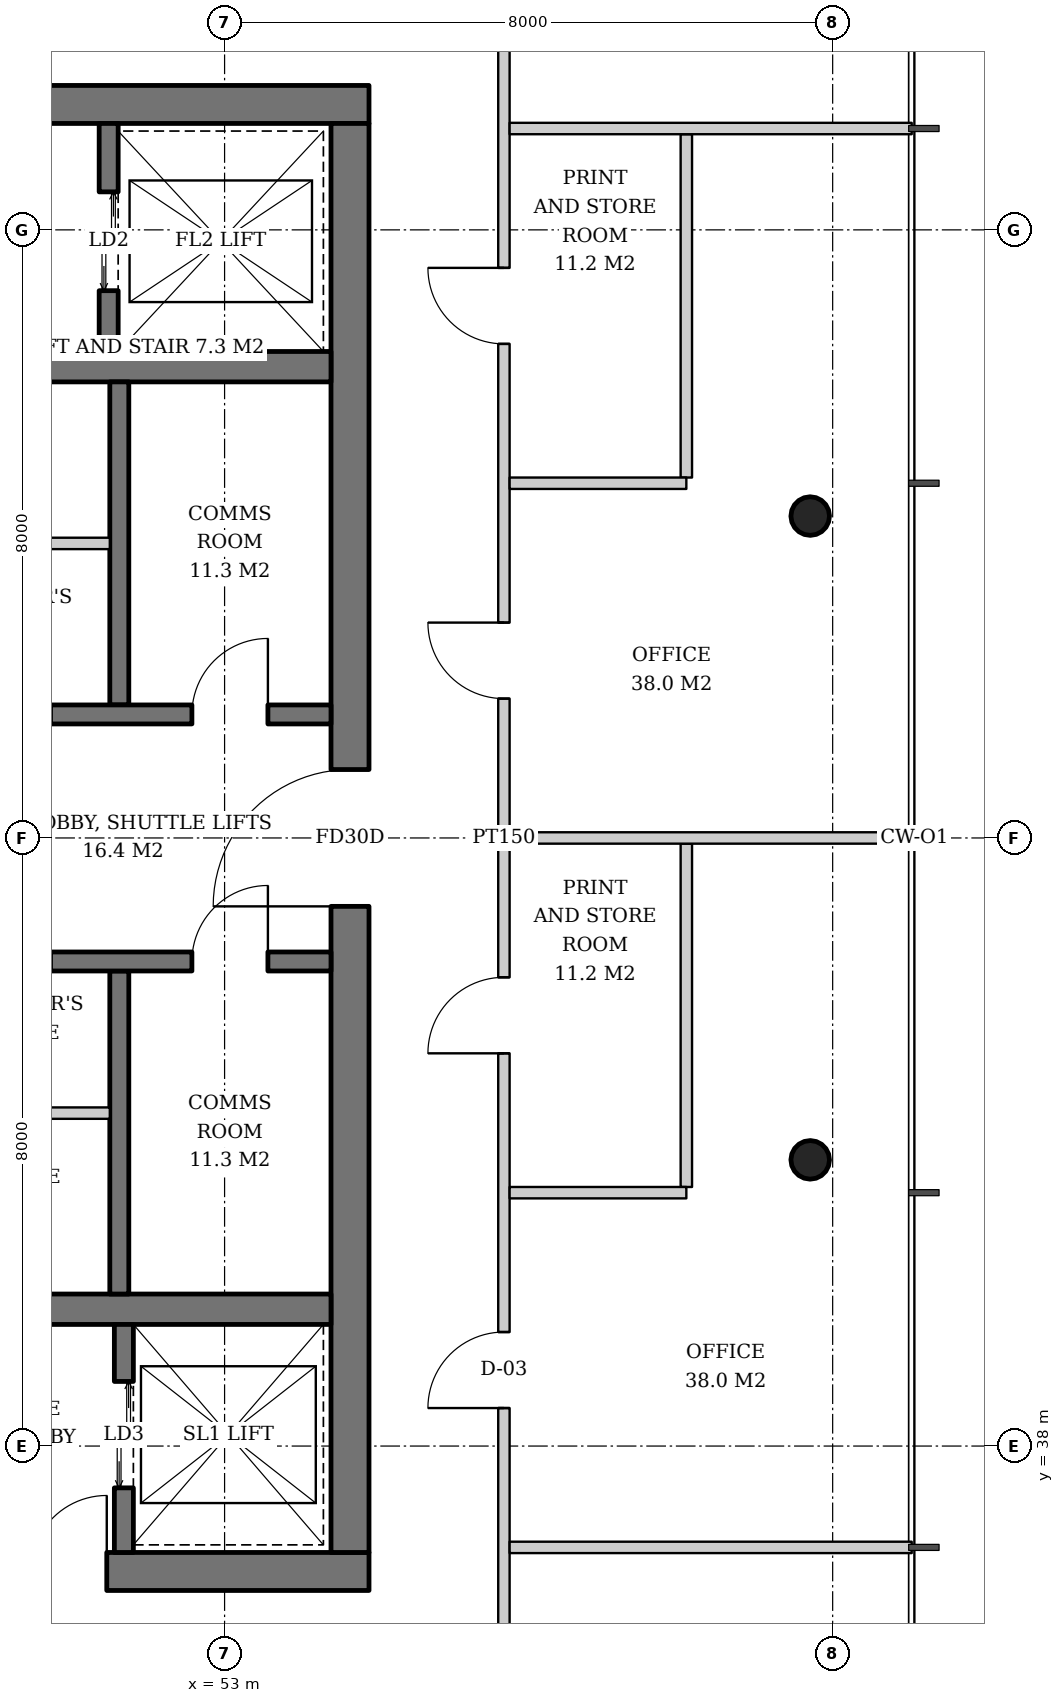
"""IFC4 building model, lengths in metres.
Left out: names, types, materials, properties, quantities, classifications, styles, units other than length and angle.
Written with IfcOpenShell. Run it as: python <this file> out.ifc"""

import sys

from ifc_helpers import new_model, si_unit, direction, frame, frame_2d, origin, origin_2d, place, context, subcontext, project, spatial, rectangle, hollow_circle, extrude, element, fill, save


model = new_model("IFC4")
c1 = context("Model", 3, precision=1e-05, world=origin(), true_north=direction((0.0, 1.0)))
c2 = subcontext(c1, "Body", "Model", "MODEL_VIEW")
j1 = project(units=[si_unit("LENGTHUNIT", "METRE"), si_unit("PLANEANGLEUNIT", "RADIAN")], contexts=[c1])
p1 = place(None, origin())
s1 = spatial("IfcSite", under=j1, at=p1, CompositionType="ELEMENT")
p2 = place(p1, origin())
s2 = spatial("IfcBuilding", under=s1, at=p2, CompositionType="ELEMENT")
p3 = place(p2, frame((0.0, 0.0, 279.4)))
s3 = spatial("IfcBuildingStorey", under=s2, at=p3, CompositionType="ELEMENT", Elevation=279.4)
for number, where, z_axis, x_axis in (
    (1, (60.743, 41.752, 0.0), (-0.032, 0.011, 0.999), (-0.316, -0.949, 0.0)),
    (2, (60.743, 50.248, 0.0), (-0.032, -0.011, 0.999), (0.316, -0.949, 0.0)),
):
    element("IfcColumn", number, at=place(p3, frame(where, z_axis=z_axis, x_axis=x_axis)), inside=s3, PredefinedType="COLUMN", context=c2, shape_type="SweptSolid", body=[
        extrude(hollow_circle(Radius=0.254, WallThickness=0.02, at=origin_2d()), origin(), (0.0, 0.0, 1.0), 3.802),
    ])
p4 = place(p3, frame((35.1, 36.35, 0.0), z_axis=(0.0, 0.0, 1.0), x_axis=(1.0, 0.0, 0.0)))
e3 = element("IfcWall", 3, at=p4, inside=s3, PredefinedType="SHEAR", context=c2, shape_type="SweptSolid", body=[
    extrude(rectangle(XDim=19.8, YDim=0.5, at=frame_2d((9.9, 0.0))), origin(), (0.0, 0.0, 1.0), 3.8),
])
p5 = place(p4, frame((3.9, 0.0, 0.0)))
e4 = element("IfcOpeningElement", 4, at=p5, cuts=e3, PredefinedType="OPENING", context=c2, shape_type="SweptSolid", body=[
    extrude(rectangle(XDim=1.0, YDim=2.1, at=frame_2d((0.5, 1.05))), frame((0.0, 0.26, 0.0), z_axis=(0.0, -1.0, 0.0), x_axis=(1.0, 0.0, 0.0)), (0.0, 0.0, 1.0), 0.52),
])
p6 = place(p4, frame((15.35, 0.0, 0.0)))
e5 = element("IfcOpeningElement", 5, at=p6, cuts=e3, PredefinedType="OPENING", context=c2, shape_type="SweptSolid", body=[
    extrude(rectangle(XDim=1.0, YDim=2.1, at=frame_2d((0.5, 1.05))), frame((0.0, 0.26, 0.0), z_axis=(0.0, -1.0, 0.0), x_axis=(1.0, 0.0, 0.0)), (0.0, 0.0, 1.0), 0.52),
])
p7 = place(p3, frame((35.1, 55.65, 0.0), z_axis=(0.0, 0.0, 1.0), x_axis=(1.0, 0.0, 0.0)))
e6 = element("IfcWall", 6, at=p7, inside=s3, PredefinedType="SHEAR", context=c2, shape_type="SweptSolid", body=[
    extrude(rectangle(XDim=19.8, YDim=0.5, at=frame_2d((9.9, 0.0))), origin(), (0.0, 0.0, 1.0), 3.8),
])
p8 = place(p7, frame((14.54, 0.0, 0.0)))
e7 = element("IfcOpeningElement", 7, at=p8, cuts=e6, PredefinedType="OPENING", context=c2, shape_type="SweptSolid", body=[
    extrude(rectangle(XDim=1.0, YDim=2.1, at=frame_2d((0.5, 1.05))), frame((0.0, 0.26, 0.0), z_axis=(0.0, -1.0, 0.0), x_axis=(1.0, 0.0, 0.0)), (0.0, 0.0, 1.0), 0.52),
])
p9 = place(p7, frame((0.865, 0.0, 0.0)))
e8 = element("IfcOpeningElement", 8, at=p9, cuts=e6, PredefinedType="OPENING", context=c2, shape_type="SweptSolid", body=[
    extrude(rectangle(XDim=1.0, YDim=2.1, at=frame_2d((0.5, 1.05))), frame((0.0, 0.26, 0.0), z_axis=(0.0, -1.0, 0.0), x_axis=(1.0, 0.0, 0.0)), (0.0, 0.0, 1.0), 0.52),
])
p10 = place(p7, frame((2.399, 0.0, 0.0)))
e9 = element("IfcOpeningElement", 9, at=p10, cuts=e6, PredefinedType="OPENING", context=c2, shape_type="SweptSolid", body=[
    extrude(rectangle(XDim=1.0, YDim=2.1, at=frame_2d((0.5, 1.05))), frame((0.0, 0.26, 0.0), z_axis=(0.0, -1.0, 0.0), x_axis=(1.0, 0.0, 0.0)), (0.0, 0.0, 1.0), 0.52),
])
p11 = place(p7, frame((3.966, 0.0, 0.0)))
e10 = element("IfcOpeningElement", 10, at=p11, cuts=e6, PredefinedType="OPENING", context=c2, shape_type="SweptSolid", body=[
    extrude(rectangle(XDim=1.0, YDim=2.1, at=frame_2d((0.5, 1.05))), frame((0.0, 0.26, 0.0), z_axis=(0.0, -1.0, 0.0), x_axis=(1.0, 0.0, 0.0)), (0.0, 0.0, 1.0), 0.52),
])
p12 = place(p3, frame((54.65, 36.6, 0.0), z_axis=(0.0, 0.0, 1.0), x_axis=(0.0, 1.0, 0.0)))
e11 = element("IfcWall", 11, at=p12, inside=s3, PredefinedType="SHEAR", context=c2, shape_type="SweptSolid", body=[
    extrude(rectangle(XDim=18.8, YDim=0.5, at=frame_2d((9.4, 0.0))), origin(), (0.0, 0.0, 1.0), 3.8),
])
p13 = place(p12, frame((8.5, 0.0, 0.0)))
e12 = element("IfcOpeningElement", 12, at=p13, cuts=e11, PredefinedType="OPENING", context=c2, shape_type="SweptSolid", body=[
    extrude(rectangle(XDim=1.8, YDim=2.4, at=frame_2d((0.9, 1.2))), frame((0.0, 0.26, 0.0), z_axis=(0.0, -1.0, 0.0), x_axis=(1.0, 0.0, 0.0)), (0.0, 0.0, 1.0), 0.52),
])
for number, where, z_axis, x_axis in (
    (13, (35.6, 39.8, 0.0), (0.0, 0.0, 1.0), (1.0, 0.0, 0.0)),
    (14, (35.6, 52.2, 0.0), (0.0, 0.0, 1.0), (1.0, 0.0, 0.0)),
):
    element("IfcWall", number, at=place(p3, frame(where, z_axis=z_axis, x_axis=x_axis)), inside=s3, PredefinedType="SHEAR", context=c2, shape_type="SweptSolid", body=[
        extrude(rectangle(XDim=18.8, YDim=0.4, at=frame_2d((9.4, 0.0))), origin(), (0.0, 0.0, 1.0), 3.8),
    ])
p14 = place(p3, frame((51.675, 36.6, 0.0), z_axis=(0.0, 0.0, 1.0), x_axis=(0.0, 1.0, 0.0)))
e15 = element("IfcWall", 15, at=p14, inside=s3, PredefinedType="SHEAR", context=c2, shape_type="SweptSolid", body=[
    extrude(rectangle(XDim=3.0, YDim=0.25, at=frame_2d((1.5, 0.0))), origin(), (0.0, 0.0, 1.0), 3.8),
])
p15 = place(p14, frame((0.85, 0.0, 0.0)))
e16 = element("IfcOpeningElement", 16, at=p15, cuts=e15, PredefinedType="OPENING", context=c2, shape_type="SweptSolid", body=[
    extrude(rectangle(XDim=1.4, YDim=2.4, at=frame_2d((0.7, 1.2))), frame((0.0, 0.135, 0.0), z_axis=(0.0, -1.0, 0.0), x_axis=(1.0, 0.0, 0.0)), (0.0, 0.0, 1.0), 0.27),
])
p16 = place(p3, frame((51.475, 52.4, 0.0), z_axis=(0.0, 0.0, 1.0), x_axis=(0.0, 1.0, 0.0)))
e17 = element("IfcWall", 17, at=p16, inside=s3, PredefinedType="SHEAR", context=c2, shape_type="SweptSolid", body=[
    extrude(rectangle(XDim=3.0, YDim=0.25, at=frame_2d((1.5, 0.0))), origin(), (0.0, 0.0, 1.0), 3.8),
])
p17 = place(p16, frame((0.8, 0.0, 0.0)))
e18 = element("IfcOpeningElement", 18, at=p17, cuts=e17, PredefinedType="OPENING", context=c2, shape_type="SweptSolid", body=[
    extrude(rectangle(XDim=1.3, YDim=2.2, at=frame_2d((0.65, 1.1))), frame((0.0, 0.135, 0.0), z_axis=(0.0, -1.0, 0.0), x_axis=(1.0, 0.0, 0.0)), (0.0, 0.0, 1.0), 0.27),
])
p18 = place(p3, frame((51.615, 47.75, 0.0), z_axis=(0.0, 0.0, 1.0), x_axis=(0.0, 1.0, 0.0)))
e19 = element("IfcWall", 19, at=p18, inside=s3, PredefinedType="SHEAR", context=c2, shape_type="SweptSolid", body=[
    extrude(rectangle(XDim=4.25, YDim=0.25, at=frame_2d((2.125, 0.0))), origin(), (0.0, 0.0, 1.0), 3.8),
])
p19 = place(p3, frame((48.93, 47.625, 0.0), z_axis=(0.0, 0.0, 1.0), x_axis=(1.0, 0.0, 0.0)))
e20 = element("IfcWall", 20, at=p19, inside=s3, PredefinedType="SHEAR", context=c2, shape_type="SweptSolid", body=[
    extrude(rectangle(XDim=5.47, YDim=0.25, at=frame_2d((2.735, 0.0))), origin(), (0.0, 0.0, 1.0), 3.8),
])
p20 = place(p19, frame((0.78, 0.0, 0.0)))
e21 = element("IfcOpeningElement", 21, at=p20, cuts=e20, PredefinedType="OPENING", context=c2, shape_type="SweptSolid", body=[
    extrude(rectangle(XDim=1.0, YDim=2.1, at=frame_2d((0.5, 1.05))), frame((0.0, 0.135, 0.0), z_axis=(0.0, -1.0, 0.0), x_axis=(1.0, 0.0, 0.0)), (0.0, 0.0, 1.0), 0.27),
])
p21 = place(p19, frame((3.64, 0.0, 0.0)))
e22 = element("IfcOpeningElement", 22, at=p21, cuts=e20, PredefinedType="OPENING", context=c2, shape_type="SweptSolid", body=[
    extrude(rectangle(XDim=1.0, YDim=2.1, at=frame_2d((0.5, 1.05))), frame((0.0, 0.135, 0.0), z_axis=(0.0, -1.0, 0.0), x_axis=(1.0, 0.0, 0.0)), (0.0, 0.0, 1.0), 0.27),
])
p22 = place(p3, frame((51.615, 44.25, 0.0), z_axis=(0.0, 0.0, 1.0), x_axis=(0.0, -1.0, 0.0)))
e23 = element("IfcWall", 23, at=p22, inside=s3, PredefinedType="SHEAR", context=c2, shape_type="SweptSolid", body=[
    extrude(rectangle(XDim=4.25, YDim=0.25, at=frame_2d((2.125, 0.0))), origin(), (0.0, 0.0, 1.0), 3.8),
])
p23 = place(p3, frame((48.93, 44.375, 0.0), z_axis=(0.0, 0.0, 1.0), x_axis=(1.0, 0.0, 0.0)))
e24 = element("IfcWall", 24, at=p23, inside=s3, PredefinedType="SHEAR", context=c2, shape_type="SweptSolid", body=[
    extrude(rectangle(XDim=5.47, YDim=0.25, at=frame_2d((2.735, 0.0))), origin(), (0.0, 0.0, 1.0), 3.8),
])
p24 = place(p23, frame((0.78, 0.0, 0.0)))
e25 = element("IfcOpeningElement", 25, at=p24, cuts=e24, PredefinedType="OPENING", context=c2, shape_type="SweptSolid", body=[
    extrude(rectangle(XDim=1.0, YDim=2.1, at=frame_2d((0.5, 1.05))), frame((0.0, 0.135, 0.0), z_axis=(0.0, -1.0, 0.0), x_axis=(1.0, 0.0, 0.0)), (0.0, 0.0, 1.0), 0.27),
])
p25 = place(p23, frame((3.64, 0.0, 0.0)))
e26 = element("IfcOpeningElement", 26, at=p25, cuts=e24, PredefinedType="OPENING", context=c2, shape_type="SweptSolid", body=[
    extrude(rectangle(XDim=1.0, YDim=2.1, at=frame_2d((0.5, 1.05))), frame((0.0, 0.135, 0.0), z_axis=(0.0, -1.0, 0.0), x_axis=(1.0, 0.0, 0.0)), (0.0, 0.0, 1.0), 0.27),
])
p26 = place(p3, frame((48.93, 49.875, 0.0), z_axis=(0.0, 0.0, 1.0), x_axis=(1.0, 0.0, 0.0)))
e27 = element("IfcWall", 27, at=p26, inside=s3, PredefinedType="SOLIDWALL", context=c2, shape_type="SweptSolid", body=[
    extrude(rectangle(XDim=2.56, YDim=0.15, at=frame_2d((1.28, 0.0))), origin(), (0.0, 0.0, 1.0), 3.5),
])
p27 = place(p26, frame((0.78, 0.0, 0.0)))
e28 = element("IfcOpeningElement", 28, at=p27, cuts=e27, PredefinedType="OPENING", context=c2, shape_type="SweptSolid", body=[
    extrude(rectangle(XDim=1.0, YDim=2.1, at=frame_2d((0.5, 1.05))), frame((0.0, 0.085, 0.0), z_axis=(0.0, -1.0, 0.0), x_axis=(1.0, 0.0, 0.0)), (0.0, 0.0, 1.0), 0.17),
])
p28 = place(p3, frame((48.93, 42.38, 0.0), z_axis=(0.0, 0.0, 1.0), x_axis=(1.0, 0.0, 0.0)))
e29 = element("IfcWall", 29, at=p28, inside=s3, PredefinedType="SOLIDWALL", context=c2, shape_type="SweptSolid", body=[
    extrude(rectangle(XDim=2.56, YDim=0.15, at=frame_2d((1.28, 0.0))), origin(), (0.0, 0.0, 1.0), 3.5),
])
p29 = place(p28, frame((0.78, 0.0, 0.0)))
e30 = element("IfcOpeningElement", 30, at=p29, cuts=e29, PredefinedType="OPENING", context=c2, shape_type="SweptSolid", body=[
    extrude(rectangle(XDim=1.0, YDim=2.1, at=frame_2d((0.5, 1.05))), frame((0.0, 0.085, 0.0), z_axis=(0.0, -1.0, 0.0), x_axis=(1.0, 0.0, 0.0)), (0.0, 0.0, 1.0), 0.17),
])
for number, where, z_axis, x_axis in (
    (31, (59.075, 41.408, 0.0), (0.0, 0.0, 1.0), (0.0, 1.0, 0.0)),
    (32, (59.075, 50.742, 0.0), (0.0, 0.0, 1.0), (0.0, 1.0, 0.0)),
):
    element("IfcWall", number, at=place(p3, frame(where, z_axis=z_axis, x_axis=x_axis)), inside=s3, PredefinedType="PARTITIONING", context=c2, shape_type="SweptSolid", body=[
        extrude(rectangle(XDim=4.517, YDim=0.15, at=frame_2d((2.258, 0.0))), origin(), (0.0, 0.0, 1.0), 2.747),
    ])
p30 = place(p3, frame((56.675, 35.249, 0.0), z_axis=(0.0, 0.0, 1.0), x_axis=(0.0, 1.0, 0.0)))
e33 = element("IfcWall", 33, at=p30, inside=s3, PredefinedType="PARTITIONING", context=c2, shape_type="SweptSolid", body=[
    extrude(rectangle(XDim=21.503, YDim=0.15, at=frame_2d((10.751, 0.0))), origin(), (0.0, 0.0, 1.0), 2.747),
])
p31 = place(p30, frame((3.251, 0.0, 0.0)))
e34 = element("IfcOpeningElement", 34, at=p31, cuts=e33, PredefinedType="OPENING", context=c2, shape_type="SweptSolid", body=[
    extrude(rectangle(XDim=1.0, YDim=2.1, at=frame_2d((0.5, 1.05))), frame((0.0, 0.085, 0.0), z_axis=(0.0, -1.0, 0.0), x_axis=(1.0, 0.0, 0.0)), (0.0, 0.0, 1.0), 0.17),
])
p32 = place(p30, frame((7.918, 0.0, 0.0)))
e35 = element("IfcOpeningElement", 35, at=p32, cuts=e33, PredefinedType="OPENING", context=c2, shape_type="SweptSolid", body=[
    extrude(rectangle(XDim=1.0, YDim=2.1, at=frame_2d((0.5, 1.05))), frame((0.0, 0.085, 0.0), z_axis=(0.0, -1.0, 0.0), x_axis=(1.0, 0.0, 0.0)), (0.0, 0.0, 1.0), 0.17),
])
p33 = place(p30, frame((12.585, 0.0, 0.0)))
e36 = element("IfcOpeningElement", 36, at=p33, cuts=e33, PredefinedType="OPENING", context=c2, shape_type="SweptSolid", body=[
    extrude(rectangle(XDim=1.0, YDim=2.1, at=frame_2d((0.5, 1.05))), frame((0.0, 0.085, 0.0), z_axis=(0.0, -1.0, 0.0), x_axis=(1.0, 0.0, 0.0)), (0.0, 0.0, 1.0), 0.17),
])
p34 = place(p30, frame((17.251, 0.0, 0.0)))
e37 = element("IfcOpeningElement", 37, at=p34, cuts=e33, PredefinedType="OPENING", context=c2, shape_type="SweptSolid", body=[
    extrude(rectangle(XDim=1.0, YDim=2.1, at=frame_2d((0.5, 1.05))), frame((0.0, 0.085, 0.0), z_axis=(0.0, -1.0, 0.0), x_axis=(1.0, 0.0, 0.0)), (0.0, 0.0, 1.0), 0.17),
])
p35 = place(p3, frame((56.75, 36.667, 0.0), z_axis=(0.0, 0.0, 1.0), x_axis=(1.0, 0.0, 0.0)))
e38 = element("IfcWall", 38, at=p35, inside=s3, PredefinedType="PARTITIONING", context=c2, shape_type="SweptSolid", body=[
    extrude(rectangle(XDim=5.29, YDim=0.15, at=frame_2d((2.645, 0.0))), origin(), (0.0, 0.0, 1.0), 3.0),
])
p36 = place(p3, frame((56.75, 41.333, 0.0), z_axis=(0.0, 0.0, 1.0), x_axis=(1.0, 0.0, 0.0)))
e39 = element("IfcWall", 39, at=p36, inside=s3, PredefinedType="PARTITIONING", context=c2, shape_type="SweptSolid", body=[
    extrude(rectangle(XDim=2.325, YDim=0.15, at=frame_2d((1.163, 0.0))), origin(), (0.0, 0.0, 1.0), 3.5),
])
p37 = place(p3, frame((56.75, 46.0, 0.0), z_axis=(0.0, 0.0, 1.0), x_axis=(1.0, 0.0, 0.0)))
e40 = element("IfcWall", 40, at=p37, inside=s3, PredefinedType="PARTITIONING", context=c2, shape_type="SweptSolid", body=[
    extrude(rectangle(XDim=5.29, YDim=0.15, at=frame_2d((2.645, 0.0))), origin(), (0.0, 0.0, 1.0), 3.0),
])
p38 = place(p3, frame((56.75, 50.667, 0.0), z_axis=(0.0, 0.0, 1.0), x_axis=(1.0, 0.0, 0.0)))
e41 = element("IfcWall", 41, at=p38, inside=s3, PredefinedType="PARTITIONING", context=c2, shape_type="SweptSolid", body=[
    extrude(rectangle(XDim=2.325, YDim=0.15, at=frame_2d((1.163, 0.0))), origin(), (0.0, 0.0, 1.0), 3.5),
])
p39 = place(p3, frame((56.75, 55.333, 0.0), z_axis=(0.0, 0.0, 1.0), x_axis=(1.0, 0.0, 0.0)))
e42 = element("IfcWall", 42, at=p39, inside=s3, PredefinedType="PARTITIONING", context=c2, shape_type="SweptSolid", body=[
    extrude(rectangle(XDim=5.29, YDim=0.15, at=frame_2d((2.645, 0.0))), origin(), (0.0, 0.0, 1.0), 3.0),
])
p40 = place(p15, origin())
e43 = element("IfcDoor", 43, at=p40, inside=s3, OperationType="DOUBLE_DOOR_SLIDING", PredefinedType="DOOR", context=c2, shape_type="SweptSolid", body=[
    extrude(rectangle(XDim=1.4, YDim=2.4, at=frame_2d((0.7, 1.2))), frame((0.0, 0.025, 0.0), z_axis=(0.0, -1.0, 0.0), x_axis=(1.0, 0.0, 0.0)), (0.0, 0.0, 1.0), 0.05),
])
fill(e16, e43)
p41 = place(p17, origin())
e44 = element("IfcDoor", 44, at=p41, inside=s3, OperationType="DOUBLE_DOOR_SLIDING", PredefinedType="DOOR", context=c2, shape_type="SweptSolid", body=[
    extrude(rectangle(XDim=1.3, YDim=2.2, at=frame_2d((0.65, 1.1))), frame((0.0, 0.025, 0.0), z_axis=(0.0, -1.0, 0.0), x_axis=(1.0, 0.0, 0.0)), (0.0, 0.0, 1.0), 0.05),
])
fill(e18, e44)
p42 = place(p21, origin())
e45 = element("IfcDoor", 45, at=p42, inside=s3, OperationType="SINGLE_SWING_RIGHT", PredefinedType="DOOR", context=c2, shape_type="SweptSolid", body=[
    extrude(rectangle(XDim=1.0, YDim=2.1, at=frame_2d((0.5, 1.05))), frame((0.0, 0.025, 0.0), z_axis=(0.0, -1.0, 0.0), x_axis=(1.0, 0.0, 0.0)), (0.0, 0.0, 1.0), 0.05),
])
fill(e22, e45)
p43 = place(p25, origin())
e46 = element("IfcDoor", 46, at=p43, inside=s3, OperationType="SINGLE_SWING_RIGHT", PredefinedType="DOOR", context=c2, shape_type="SweptSolid", body=[
    extrude(rectangle(XDim=1.0, YDim=2.1, at=frame_2d((0.5, 1.05))), frame((0.0, 0.025, 0.0), z_axis=(0.0, -1.0, 0.0), x_axis=(1.0, 0.0, 0.0)), (0.0, 0.0, 1.0), 0.05),
])
fill(e26, e46)
p44 = place(p13, origin())
e47 = element("IfcDoor", 47, at=p44, inside=s3, OperationType="DOUBLE_DOOR_SINGLE_SWING", PredefinedType="DOOR", context=c2, shape_type="SweptSolid", body=[
    extrude(rectangle(XDim=1.8, YDim=2.4, at=frame_2d((0.9, 1.2))), frame((0.0, 0.025, 0.0), z_axis=(0.0, -1.0, 0.0), x_axis=(1.0, 0.0, 0.0)), (0.0, 0.0, 1.0), 0.05),
])
fill(e12, e47)
p45 = place(p6, origin())
e48 = element("IfcDoor", 48, at=p45, inside=s3, OperationType="SINGLE_SWING_RIGHT", PredefinedType="DOOR", context=c2, shape_type="SweptSolid", body=[
    extrude(rectangle(XDim=1.0, YDim=2.1, at=frame_2d((0.5, 1.05))), frame((0.0, 0.025, 0.0), z_axis=(0.0, -1.0, 0.0), x_axis=(1.0, 0.0, 0.0)), (0.0, 0.0, 1.0), 0.05),
])
fill(e5, e48)
p46 = place(p31, origin())
e49 = element("IfcDoor", 49, at=p46, inside=s3, OperationType="SINGLE_SWING_LEFT", PredefinedType="DOOR", context=c2, shape_type="SweptSolid", body=[
    extrude(rectangle(XDim=1.0, YDim=2.1, at=frame_2d((0.5, 1.05))), frame((0.0, 0.025, 0.0), z_axis=(0.0, -1.0, 0.0), x_axis=(1.0, 0.0, 0.0)), (0.0, 0.0, 1.0), 0.05),
])
fill(e34, e49)
p47 = place(p32, origin())
e50 = element("IfcDoor", 50, at=p47, inside=s3, OperationType="SINGLE_SWING_LEFT", PredefinedType="DOOR", context=c2, shape_type="SweptSolid", body=[
    extrude(rectangle(XDim=1.0, YDim=2.1, at=frame_2d((0.5, 1.05))), frame((0.0, 0.025, 0.0), z_axis=(0.0, -1.0, 0.0), x_axis=(1.0, 0.0, 0.0)), (0.0, 0.0, 1.0), 0.05),
])
fill(e35, e50)
p48 = place(p33, origin())
e51 = element("IfcDoor", 51, at=p48, inside=s3, OperationType="SINGLE_SWING_RIGHT", PredefinedType="DOOR", context=c2, shape_type="SweptSolid", body=[
    extrude(rectangle(XDim=1.0, YDim=2.1, at=frame_2d((0.5, 1.05))), frame((0.0, 0.025, 0.0), z_axis=(0.0, -1.0, 0.0), x_axis=(1.0, 0.0, 0.0)), (0.0, 0.0, 1.0), 0.05),
])
fill(e36, e51)
p49 = place(p34, origin())
e52 = element("IfcDoor", 52, at=p49, inside=s3, OperationType="SINGLE_SWING_RIGHT", PredefinedType="DOOR", context=c2, shape_type="SweptSolid", body=[
    extrude(rectangle(XDim=1.0, YDim=2.1, at=frame_2d((0.5, 1.05))), frame((0.0, 0.025, 0.0), z_axis=(0.0, -1.0, 0.0), x_axis=(1.0, 0.0, 0.0)), (0.0, 0.0, 1.0), 0.05),
])
fill(e37, e52)
save(model, sys.argv[1])
